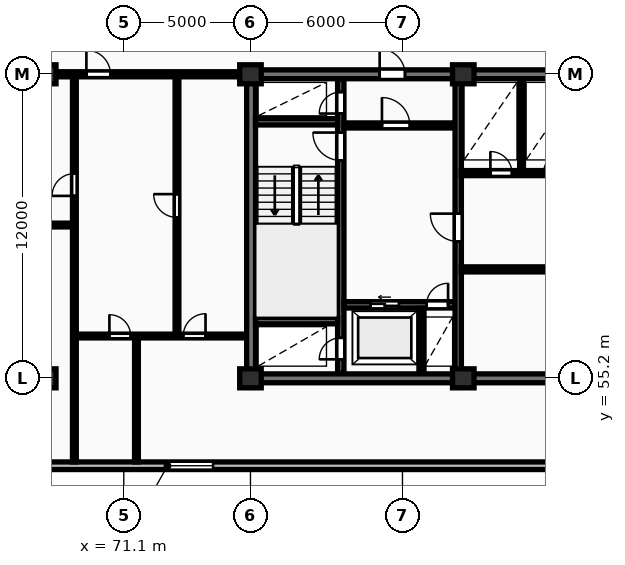
"""IFC4 building model, lengths in metres.
Left out: names, types, materials, properties, quantities, classifications, styles, units other than length and angle.
Written with IfcOpenShell. Run it as: python <this file> out.ifc"""

import sys

from ifc_helpers import new_model, si_unit, direction, frame, frame_2d, origin, origin_2d, place, context, subcontext, project, spatial, rectangle, extrude, element, fill, save


model = new_model("IFC4")
c1 = context("Model", 3, precision=1e-05, world=origin(), true_north=direction((0.0, 1.0)))
c2 = subcontext(c1, "Body", "Model", "MODEL_VIEW")
j1 = project(units=[si_unit("LENGTHUNIT", "METRE"), si_unit("PLANEANGLEUNIT", "RADIAN")], contexts=[c1])
p1 = place(None, origin())
s1 = spatial("IfcSite", under=j1, at=p1, CompositionType="ELEMENT")
p2 = place(p1, origin())
s2 = spatial("IfcBuilding", under=s1, at=p2, CompositionType="ELEMENT")
p3 = place(p2, frame((0.0, 0.0, 210.85)))
s3 = spatial("IfcBuildingStorey", under=s2, at=p3, CompositionType="ELEMENT", Elevation=210.85)
for number, where, z_axis, x_axis in (
    (1, (68.0, 55.2, 0.0), (0.0, 0.0, 1.0), (1.0, 0.0, 0.0)),
    (2, (68.0, 67.2, 0.0), (0.0, 0.0, 1.0), (1.0, 0.0, 0.0)),
    (3, (76.1, 55.2, 0.0), (0.0, 0.0, 1.0), (1.0, 0.0, 0.0)),
    (4, (76.1, 67.2, 0.0), (0.0, 0.0, 1.0), (1.0, 0.0, 0.0)),
    (5, (84.5, 55.2, 0.0), (0.0, 0.0, 1.0), (1.0, 0.0, 0.0)),
    (6, (84.5, 67.2, 0.0), (0.0, 0.0, 1.0), (1.0, 0.0, 0.0)),
):
    element("IfcColumn", number, at=place(p3, frame(where, z_axis=z_axis, x_axis=x_axis)), inside=s3, PredefinedType="COLUMN", context=c2, shape_type="SweptSolid", body=[
        extrude(rectangle(XDim=0.85, YDim=0.75, at=origin_2d()), origin(), (0.0, 0.0, 1.0), 3.25),
    ])
p4 = place(p3, frame((59.8, 51.75, 0.0), z_axis=(0.0, 0.0, 1.0), x_axis=(1.0, 0.0, 0.0)))
e7 = element("IfcWall", 7, at=p4, inside=s3, PredefinedType="STANDARD", context=c2, shape_type="SweptSolid", body=[
    extrude(rectangle(XDim=68.6, YDim=0.3, at=frame_2d((34.3, 0.0))), origin(), (0.0, 0.0, 1.0), 2.97),
])
p5 = place(p4, frame((13.025, 0.0, 0.85)))
e8 = element("IfcOpeningElement", 8, at=p5, cuts=e7, PredefinedType="OPENING", context=c2, shape_type="SweptSolid", body=[
    extrude(rectangle(XDim=1.8, YDim=1.8, at=frame_2d((0.9, 0.9))), frame((0.0, 0.16, 0.0), z_axis=(0.0, -1.0, 0.0), x_axis=(1.0, 0.0, 0.0)), (0.0, 0.0, 1.0), 0.32),
])
p6 = place(p4, frame((56.375, 0.0, 0.85)))
e9 = element("IfcOpeningElement", 9, at=p6, cuts=e7, PredefinedType="OPENING", context=c2, shape_type="SweptSolid", body=[
    extrude(rectangle(XDim=1.8, YDim=1.8, at=frame_2d((0.9, 0.9))), frame((0.0, 0.16, 0.0), z_axis=(0.0, -1.0, 0.0), x_axis=(1.0, 0.0, 0.0)), (0.0, 0.0, 1.0), 0.32),
])
p7 = place(p3, frame((75.95, 55.2, 0.0), z_axis=(0.0, 0.0, 1.0), x_axis=(1.0, 0.0, 0.0)))
e10 = element("IfcWall", 10, at=p7, inside=s3, PredefinedType="SHEAR", context=c2, shape_type="SweptSolid", body=[
    extrude(rectangle(XDim=36.3, YDim=0.35, at=frame_2d((18.15, 0.0))), origin(), (0.0, 0.0, 1.0), 3.25),
])
p8 = place(p3, frame((76.125, 55.375, 0.0), z_axis=(0.0, 0.0, 1.0), x_axis=(0.0, 1.0, 0.0)))
e11 = element("IfcWall", 11, at=p8, inside=s3, PredefinedType="SHEAR", context=c2, shape_type="SweptSolid", body=[
    extrude(rectangle(XDim=11.65, YDim=0.35, at=frame_2d((5.825, 0.0))), origin(), (0.0, 0.0, 1.0), 3.25),
])
p9 = place(p3, frame((75.95, 67.2, 0.0), z_axis=(0.0, 0.0, 1.0), x_axis=(1.0, 0.0, 0.0)))
e12 = element("IfcWall", 12, at=p9, inside=s3, PredefinedType="SHEAR", context=c2, shape_type="SweptSolid", body=[
    extrude(rectangle(XDim=36.3, YDim=0.35, at=frame_2d((18.15, 0.0))), origin(), (0.0, 0.0, 1.0), 3.25),
])
p10 = place(p9, frame((5.25, 0.0, 0.0)))
e13 = element("IfcOpeningElement", 13, at=p10, cuts=e12, PredefinedType="OPENING", context=c2, shape_type="SweptSolid", body=[
    extrude(rectangle(XDim=1.0, YDim=2.15, at=frame_2d((0.5, 1.075))), frame((0.0, 0.185, 0.0), z_axis=(0.0, -1.0, 0.0), x_axis=(1.0, 0.0, 0.0)), (0.0, 0.0, 1.0), 0.37),
])
p11 = place(p9, frame((21.6, 0.0, 0.0)))
e14 = element("IfcOpeningElement", 14, at=p11, cuts=e12, PredefinedType="OPENING", context=c2, shape_type="SweptSolid", body=[
    extrude(rectangle(XDim=1.5, YDim=2.2, at=frame_2d((0.75, 1.1))), frame((0.0, 0.185, 0.0), z_axis=(0.0, -1.0, 0.0), x_axis=(1.0, 0.0, 0.0)), (0.0, 0.0, 1.0), 0.37),
])
p12 = place(p9, frame((30.45, 0.0, 0.0)))
e15 = element("IfcOpeningElement", 15, at=p12, cuts=e12, PredefinedType="OPENING", context=c2, shape_type="SweptSolid", body=[
    extrude(rectangle(XDim=1.0, YDim=2.15, at=frame_2d((0.5, 1.075))), frame((0.0, 0.185, 0.0), z_axis=(0.0, -1.0, 0.0), x_axis=(1.0, 0.0, 0.0)), (0.0, 0.0, 1.0), 0.37),
])
p13 = place(p3, frame((79.665, 55.4, 0.0), z_axis=(0.0, 0.0, 1.0), x_axis=(0.0, 1.0, 0.0)))
e16 = element("IfcWall", 16, at=p13, inside=s3, PredefinedType="SHEAR", context=c2, shape_type="SweptSolid", body=[
    extrude(rectangle(XDim=11.6, YDim=0.25, at=frame_2d((5.8, 0.0))), origin(), (0.0, 0.0, 1.0), 3.25),
])
p14 = place(p13, frame((0.55, 0.0, 0.0)))
e17 = element("IfcOpeningElement", 17, at=p14, cuts=e16, PredefinedType="OPENING", context=c2, shape_type="SweptSolid", body=[
    extrude(rectangle(XDim=0.85, YDim=2.05, at=frame_2d((0.425, 1.025))), frame((0.0, 0.135, 0.0), z_axis=(0.0, -1.0, 0.0), x_axis=(1.0, 0.0, 0.0)), (0.0, 0.0, 1.0), 0.27),
])
p15 = place(p13, frame((8.4, 0.0, 0.0)))
e18 = element("IfcOpeningElement", 18, at=p15, cuts=e16, PredefinedType="OPENING", context=c2, shape_type="SweptSolid", body=[
    extrude(rectangle(XDim=1.1, YDim=2.1, at=frame_2d((0.55, 1.05))), frame((0.0, 0.135, 0.0), z_axis=(0.0, -1.0, 0.0), x_axis=(1.0, 0.0, 0.0)), (0.0, 0.0, 1.0), 0.27),
])
p16 = place(p13, frame((10.25, 0.0, 0.0)))
e19 = element("IfcOpeningElement", 19, at=p16, cuts=e16, PredefinedType="OPENING", context=c2, shape_type="SweptSolid", body=[
    extrude(rectangle(XDim=0.85, YDim=2.05, at=frame_2d((0.425, 1.025))), frame((0.0, 0.135, 0.0), z_axis=(0.0, -1.0, 0.0), x_axis=(1.0, 0.0, 0.0)), (0.0, 0.0, 1.0), 0.27),
])
for number, where, z_axis, x_axis in (
    (20, (76.3, 57.475, 0.0), (0.0, 0.0, 1.0), (1.0, 0.0, 0.0)),
    (21, (76.3, 65.325, 0.0), (0.0, 0.0, 1.0), (1.0, 0.0, 0.0)),
):
    element("IfcWall", number, at=place(p3, frame(where, z_axis=z_axis, x_axis=x_axis)), inside=s3, PredefinedType="SHEAR", context=c2, shape_type="SweptSolid", body=[
        extrude(rectangle(XDim=3.24, YDim=0.25, at=frame_2d((1.62, 0.0))), origin(), (0.0, 0.0, 1.0), 3.25),
    ])
p17 = place(p3, frame((79.79, 58.1, 0.0), z_axis=(0.0, 0.0, 1.0), x_axis=(1.0, 0.0, 0.0)))
e22 = element("IfcWall", 22, at=p17, inside=s3, PredefinedType="SHEAR", context=c2, shape_type="SweptSolid", body=[
    extrude(rectangle(XDim=4.39, YDim=0.25, at=frame_2d((2.195, 0.0))), origin(), (0.0, 0.0, 1.0), 3.25),
])
p18 = place(p17, frame((1.05, 0.0, 0.0)))
e23 = element("IfcOpeningElement", 23, at=p18, cuts=e22, PredefinedType="OPENING", context=c2, shape_type="SweptSolid", body=[
    extrude(rectangle(XDim=1.12, YDim=2.12, at=frame_2d((0.56, 1.06))), frame((0.0, 0.135, 0.0), z_axis=(0.0, -1.0, 0.0), x_axis=(1.0, 0.0, 0.0)), (0.0, 0.0, 1.0), 0.27),
])
p19 = place(p17, frame((3.26, 0.0, 0.0)))
e24 = element("IfcOpeningElement", 24, at=p19, cuts=e22, PredefinedType="OPENING", context=c2, shape_type="SweptSolid", body=[
    extrude(rectangle(XDim=0.85, YDim=2.05, at=frame_2d((0.425, 1.025))), frame((0.0, 0.135, 0.0), z_axis=(0.0, -1.0, 0.0), x_axis=(1.0, 0.0, 0.0)), (0.0, 0.0, 1.0), 0.27),
])
p20 = place(p3, frame((82.85, 55.4, 0.0), z_axis=(0.0, 0.0, 1.0), x_axis=(0.0, 1.0, 0.0)))
e25 = element("IfcWall", 25, at=p20, inside=s3, PredefinedType="PARTITIONING", context=c2, shape_type="SweptSolid", body=[
    extrude(rectangle(XDim=2.56, YDim=0.2, at=frame_2d((1.28, 0.0))), origin(), (0.0, 0.0, 1.0), 2.97),
])
p21 = place(p3, frame((79.79, 65.18, 0.0), z_axis=(0.0, 0.0, 1.0), x_axis=(1.0, 0.0, 0.0)))
e26 = element("IfcWall", 26, at=p21, inside=s3, PredefinedType="PARTITIONING", context=c2, shape_type="SweptSolid", body=[
    extrude(rectangle(XDim=4.39, YDim=0.2, at=frame_2d((2.195, 0.0))), origin(), (0.0, 0.0, 1.0), 2.97),
])
p22 = place(p21, frame((1.5, 0.0, 0.0)))
e27 = element("IfcOpeningElement", 27, at=p22, cuts=e26, PredefinedType="OPENING", context=c2, shape_type="SweptSolid", body=[
    extrude(rectangle(XDim=1.1, YDim=2.1, at=frame_2d((0.55, 1.05))), frame((0.0, 0.11, 0.0), z_axis=(0.0, -1.0, 0.0), x_axis=(1.0, 0.0, 0.0)), (0.0, 0.0, 1.0), 0.22),
])
p23 = place(p3, frame((84.3, 55.4, 0.0), z_axis=(0.0, 0.0, 1.0), x_axis=(0.0, 1.0, 0.0)))
e28 = element("IfcWall", 28, at=p23, inside=s3, PredefinedType="SHEAR", context=c2, shape_type="SweptSolid", body=[
    extrude(rectangle(XDim=11.6, YDim=0.25, at=frame_2d((5.8, 0.0))), origin(), (0.0, 0.0, 1.0), 3.25),
])
p24 = place(p23, frame((5.2, 0.0, 0.0)))
e29 = element("IfcOpeningElement", 29, at=p24, cuts=e28, PredefinedType="OPENING", context=c2, shape_type="SweptSolid", body=[
    extrude(rectangle(XDim=1.1, YDim=2.1, at=frame_2d((0.55, 1.05))), frame((0.0, 0.135, 0.0), z_axis=(0.0, -1.0, 0.0), x_axis=(1.0, 0.0, 0.0)), (0.0, 0.0, 1.0), 0.27),
])
p25 = place(p3, frame((84.42, 59.5, 0.0), z_axis=(0.0, 0.0, 1.0), x_axis=(1.0, 0.0, 0.0)))
e30 = element("IfcWall", 30, at=p25, inside=s3, PredefinedType="PARTITIONING", context=c2, shape_type="SweptSolid", body=[
    extrude(rectangle(XDim=8.36, YDim=0.2, at=frame_2d((4.18, 0.0))), origin(), (0.0, 0.0, 1.0), 2.97),
])
p26 = place(p25, frame((3.4, 0.0, 0.0)))
e31 = element("IfcOpeningElement", 31, at=p26, cuts=e30, PredefinedType="OPENING", context=c2, shape_type="SweptSolid", body=[
    extrude(rectangle(XDim=0.92, YDim=2.08, at=frame_2d((0.46, 1.04))), frame((0.0, 0.11, 0.0), z_axis=(0.0, -1.0, 0.0), x_axis=(1.0, 0.0, 0.0)), (0.0, 0.0, 1.0), 0.22),
])
p27 = place(p3, frame((86.8, 63.4, 0.0), z_axis=(0.0, 0.0, 1.0), x_axis=(0.0, 1.0, 0.0)))
e32 = element("IfcWall", 32, at=p27, inside=s3, PredefinedType="PARTITIONING", context=c2, shape_type="SweptSolid", body=[
    extrude(rectangle(XDim=3.6, YDim=0.15, at=frame_2d((1.8, 0.0))), origin(), (0.0, 0.0, 1.0), 2.97),
])
p28 = place(p3, frame((84.42, 63.3, 0.0), z_axis=(0.0, 0.0, 1.0), x_axis=(1.0, 0.0, 0.0)))
e33 = element("IfcWall", 33, at=p28, inside=s3, PredefinedType="PARTITIONING", context=c2, shape_type="SweptSolid", body=[
    extrude(rectangle(XDim=19.83, YDim=0.2, at=frame_2d((9.915, 0.0))), origin(), (0.0, 0.0, 1.0), 2.97),
])
p29 = place(p28, frame((1.15, 0.0, 0.0)))
e34 = element("IfcOpeningElement", 34, at=p29, cuts=e33, PredefinedType="OPENING", context=c2, shape_type="SweptSolid", body=[
    extrude(rectangle(XDim=0.85, YDim=2.05, at=frame_2d((0.425, 1.025))), frame((0.0, 0.11, 0.0), z_axis=(0.0, -1.0, 0.0), x_axis=(1.0, 0.0, 0.0)), (0.0, 0.0, 1.0), 0.22),
])
p30 = place(p28, frame((3.25, 0.0, 0.0)))
e35 = element("IfcOpeningElement", 35, at=p30, cuts=e33, PredefinedType="OPENING", context=c2, shape_type="SweptSolid", body=[
    extrude(rectangle(XDim=0.85, YDim=2.05, at=frame_2d((0.425, 1.025))), frame((0.0, 0.11, 0.0), z_axis=(0.0, -1.0, 0.0), x_axis=(1.0, 0.0, 0.0)), (0.0, 0.0, 1.0), 0.22),
])
p31 = place(p28, frame((13.08, 0.0, 0.0)))
e36 = element("IfcOpeningElement", 36, at=p31, cuts=e33, PredefinedType="OPENING", context=c2, shape_type="SweptSolid", body=[
    extrude(rectangle(XDim=1.5, YDim=2.2, at=frame_2d((0.75, 1.1))), frame((0.0, 0.11, 0.0), z_axis=(0.0, -1.0, 0.0), x_axis=(1.0, 0.0, 0.0)), (0.0, 0.0, 1.0), 0.22),
])
p32 = place(p28, frame((5.53, 0.0, 0.0)))
e37 = element("IfcOpeningElement", 37, at=p32, cuts=e33, PredefinedType="OPENING", context=c2, shape_type="SweptSolid", body=[
    extrude(rectangle(XDim=0.88, YDim=2.06, at=frame_2d((0.44, 1.03))), frame((0.0, 0.11, 0.0), z_axis=(0.0, -1.0, 0.0), x_axis=(1.0, 0.0, 0.0)), (0.0, 0.0, 1.0), 0.22),
])
p33 = place(p28, frame((7.68, 0.0, 0.0)))
e38 = element("IfcOpeningElement", 38, at=p33, cuts=e33, PredefinedType="OPENING", context=c2, shape_type="SweptSolid", body=[
    extrude(rectangle(XDim=0.88, YDim=2.06, at=frame_2d((0.44, 1.03))), frame((0.0, 0.11, 0.0), z_axis=(0.0, -1.0, 0.0), x_axis=(1.0, 0.0, 0.0)), (0.0, 0.0, 1.0), 0.22),
])
p34 = place(p28, frame((10.43, 0.0, 0.0)))
e39 = element("IfcOpeningElement", 39, at=p34, cuts=e33, PredefinedType="OPENING", context=c2, shape_type="SweptSolid", body=[
    extrude(rectangle(XDim=0.85, YDim=2.05, at=frame_2d((0.425, 1.025))), frame((0.0, 0.11, 0.0), z_axis=(0.0, -1.0, 0.0), x_axis=(1.0, 0.0, 0.0)), (0.0, 0.0, 1.0), 0.22),
])
p35 = place(p28, frame((16.23, 0.0, 0.0)))
e40 = element("IfcOpeningElement", 40, at=p35, cuts=e33, PredefinedType="OPENING", context=c2, shape_type="SweptSolid", body=[
    extrude(rectangle(XDim=0.96, YDim=2.1, at=frame_2d((0.48, 1.05))), frame((0.0, 0.11, 0.0), z_axis=(0.0, -1.0, 0.0), x_axis=(1.0, 0.0, 0.0)), (0.0, 0.0, 1.0), 0.22),
])
p36 = place(p28, frame((18.68, 0.0, 0.0)))
e41 = element("IfcOpeningElement", 41, at=p36, cuts=e33, PredefinedType="OPENING", context=c2, shape_type="SweptSolid", body=[
    extrude(rectangle(XDim=0.84, YDim=2.04, at=frame_2d((0.42, 1.02))), frame((0.0, 0.11, 0.0), z_axis=(0.0, -1.0, 0.0), x_axis=(1.0, 0.0, 0.0)), (0.0, 0.0, 1.0), 0.22),
])
p37 = place(p3, frame((59.8, 61.25, 0.0), z_axis=(0.0, 0.0, 1.0), x_axis=(1.0, 0.0, 0.0)))
e42 = element("IfcWall", 42, at=p37, inside=s3, PredefinedType="PARTITIONING", context=c2, shape_type="SweptSolid", body=[
    extrude(rectangle(XDim=9.35, YDim=0.15, at=frame_2d((4.675, 0.0))), origin(), (0.0, 0.0, 1.0), 2.97),
])
p38 = place(p37, frame((4.255, 0.0, 0.0)))
e43 = element("IfcOpeningElement", 43, at=p38, cuts=e42, PredefinedType="OPENING", context=c2, shape_type="SweptSolid", body=[
    extrude(rectangle(XDim=0.84, YDim=2.04, at=frame_2d((0.42, 1.02))), frame((0.0, 0.085, 0.0), z_axis=(0.0, -1.0, 0.0), x_axis=(1.0, 0.0, 0.0)), (0.0, 0.0, 1.0), 0.17),
])
p39 = place(p3, frame((69.15, 51.9, 0.0), z_axis=(0.0, 0.0, 1.0), x_axis=(0.0, 1.0, 0.0)))
e44 = element("IfcWall", 44, at=p39, inside=s3, PredefinedType="PARTITIONING", context=c2, shape_type="SweptSolid", body=[
    extrude(rectangle(XDim=15.25, YDim=0.15, at=frame_2d((7.625, 0.0))), origin(), (0.0, 0.0, 1.0), 2.97),
])
p40 = place(p39, frame((10.5, 0.0, 0.0)))
e45 = element("IfcOpeningElement", 45, at=p40, cuts=e44, PredefinedType="OPENING", context=c2, shape_type="SweptSolid", body=[
    extrude(rectangle(XDim=0.88, YDim=2.06, at=frame_2d((0.44, 1.03))), frame((0.0, 0.085, 0.0), z_axis=(0.0, -1.0, 0.0), x_axis=(1.0, 0.0, 0.0)), (0.0, 0.0, 1.0), 0.17),
])
p41 = place(p3, frame((73.2, 56.87, 0.0), z_axis=(0.0, 0.0, 1.0), x_axis=(0.0, 1.0, 0.0)))
e46 = element("IfcWall", 46, at=p41, inside=s3, PredefinedType="PARTITIONING", context=c2, shape_type="SweptSolid", body=[
    extrude(rectangle(XDim=10.28, YDim=0.15, at=frame_2d((5.14, 0.0))), origin(), (0.0, 0.0, 1.0), 2.97),
])
p42 = place(p41, frame((4.68, 0.0, 0.0)))
e47 = element("IfcOpeningElement", 47, at=p42, cuts=e46, PredefinedType="OPENING", context=c2, shape_type="SweptSolid", body=[
    extrude(rectangle(XDim=0.92, YDim=2.08, at=frame_2d((0.46, 1.04))), frame((0.0, 0.085, 0.0), z_axis=(0.0, -1.0, 0.0), x_axis=(1.0, 0.0, 0.0)), (0.0, 0.0, 1.0), 0.17),
])
p43 = place(p3, frame((71.6, 51.9, 0.0), z_axis=(0.0, 0.0, 1.0), x_axis=(0.0, 1.0, 0.0)))
e48 = element("IfcWall", 48, at=p43, inside=s3, PredefinedType="PARTITIONING", context=c2, shape_type="SweptSolid", body=[
    extrude(rectangle(XDim=4.97, YDim=0.15, at=frame_2d((2.485, 0.0))), origin(), (0.0, 0.0, 1.0), 2.97),
])
p44 = place(p3, frame((69.17, 56.87, 0.0), z_axis=(0.0, 0.0, 1.0), x_axis=(1.0, 0.0, 0.0)))
e49 = element("IfcWall", 49, at=p44, inside=s3, PredefinedType="PARTITIONING", context=c2, shape_type="SweptSolid", body=[
    extrude(rectangle(XDim=6.76, YDim=0.15, at=frame_2d((3.38, 0.0))), origin(), (0.0, 0.0, 1.0), 2.97),
])
p45 = place(p44, frame((1.362, 0.0, 0.0)))
e50 = element("IfcOpeningElement", 50, at=p45, cuts=e49, PredefinedType="OPENING", context=c2, shape_type="SweptSolid", body=[
    extrude(rectangle(XDim=0.84, YDim=2.04, at=frame_2d((0.42, 1.02))), frame((0.0, 0.085, 0.0), z_axis=(0.0, -1.0, 0.0), x_axis=(1.0, 0.0, 0.0)), (0.0, 0.0, 1.0), 0.17),
])
p46 = place(p44, frame((4.277, 0.0, 0.0)))
e51 = element("IfcOpeningElement", 51, at=p46, cuts=e49, PredefinedType="OPENING", context=c2, shape_type="SweptSolid", body=[
    extrude(rectangle(XDim=0.88, YDim=2.06, at=frame_2d((0.44, 1.03))), frame((0.0, 0.085, 0.0), z_axis=(0.0, -1.0, 0.0), x_axis=(1.0, 0.0, 0.0)), (0.0, 0.0, 1.0), 0.17),
])
p47 = place(p3, frame((59.8, 67.2, 0.0), z_axis=(0.0, 0.0, 1.0), x_axis=(1.0, 0.0, 0.0)))
e52 = element("IfcWall", 52, at=p47, inside=s3, PredefinedType="PARTITIONING", context=c2, shape_type="SweptSolid", body=[
    extrude(rectangle(XDim=16.15, YDim=0.2, at=frame_2d((8.075, 0.0))), origin(), (0.0, 0.0, 1.0), 2.433),
])
p48 = place(p47, frame((9.823, 0.0, 0.0)))
e53 = element("IfcOpeningElement", 53, at=p48, cuts=e52, PredefinedType="OPENING", context=c2, shape_type="SweptSolid", body=[
    extrude(rectangle(XDim=0.95, YDim=2.15, at=frame_2d((0.475, 1.075))), frame((0.0, 0.11, 0.0), z_axis=(0.0, -1.0, 0.0), x_axis=(1.0, 0.0, 0.0)), (0.0, 0.0, 1.0), 0.22),
])
p49 = place(p5, origin())
e54 = element("IfcWindow", 54, at=p49, inside=s3, PartitioningType="SINGLE_PANEL", PredefinedType="WINDOW", context=c2, shape_type="SweptSolid", body=[
    extrude(rectangle(XDim=1.8, YDim=1.8, at=frame_2d((0.9, 0.9))), frame((0.0, 0.03, 0.0), z_axis=(0.0, -1.0, 0.0), x_axis=(1.0, 0.0, 0.0)), (0.0, 0.0, 1.0), 0.06),
])
fill(e8, e54)
p50 = place(p10, origin())
e55 = element("IfcDoor", 55, at=p50, inside=s3, OperationType="SINGLE_SWING_LEFT", PredefinedType="DOOR", context=c2, shape_type="SweptSolid", body=[
    extrude(rectangle(XDim=1.0, YDim=2.15, at=frame_2d((0.5, 1.075))), frame((0.0, 0.025, 0.0), z_axis=(0.0, -1.0, 0.0), x_axis=(1.0, 0.0, 0.0)), (0.0, 0.0, 1.0), 0.05),
])
fill(e13, e55)
p51 = place(p14, origin())
e56 = element("IfcDoor", 56, at=p51, inside=s3, OperationType="SINGLE_SWING_LEFT", PredefinedType="DOOR", context=c2, shape_type="SweptSolid", body=[
    extrude(rectangle(XDim=0.85, YDim=2.05, at=frame_2d((0.425, 1.025))), frame((0.0, 0.025, 0.0), z_axis=(0.0, -1.0, 0.0), x_axis=(1.0, 0.0, 0.0)), (0.0, 0.0, 1.0), 0.05),
])
fill(e17, e56)
p52 = place(p15, origin())
e57 = element("IfcDoor", 57, at=p52, inside=s3, OperationType="SINGLE_SWING_RIGHT", PredefinedType="DOOR", context=c2, shape_type="SweptSolid", body=[
    extrude(rectangle(XDim=1.1, YDim=2.1, at=frame_2d((0.55, 1.05))), frame((0.0, 0.025, 0.0), z_axis=(0.0, -1.0, 0.0), x_axis=(1.0, 0.0, 0.0)), (0.0, 0.0, 1.0), 0.05),
])
fill(e18, e57)
p53 = place(p16, origin())
e58 = element("IfcDoor", 58, at=p53, inside=s3, OperationType="SINGLE_SWING_LEFT", PredefinedType="DOOR", context=c2, shape_type="SweptSolid", body=[
    extrude(rectangle(XDim=0.85, YDim=2.05, at=frame_2d((0.425, 1.025))), frame((0.0, 0.025, 0.0), z_axis=(0.0, -1.0, 0.0), x_axis=(1.0, 0.0, 0.0)), (0.0, 0.0, 1.0), 0.05),
])
fill(e19, e58)
p54 = place(p18, origin())
e59 = element("IfcDoor", 59, at=p54, inside=s3, OperationType="SLIDING_TO_LEFT", PredefinedType="DOOR", context=c2, shape_type="SweptSolid", body=[
    extrude(rectangle(XDim=1.12, YDim=2.12, at=frame_2d((0.56, 1.06))), frame((0.0, 0.025, 0.0), z_axis=(0.0, -1.0, 0.0), x_axis=(1.0, 0.0, 0.0)), (0.0, 0.0, 1.0), 0.05),
])
fill(e23, e59)
p55 = place(p19, origin())
e60 = element("IfcDoor", 60, at=p55, inside=s3, OperationType="SINGLE_SWING_RIGHT", PredefinedType="DOOR", context=c2, shape_type="SweptSolid", body=[
    extrude(rectangle(XDim=0.85, YDim=2.05, at=frame_2d((0.425, 1.025))), frame((0.0, 0.025, 0.0), z_axis=(0.0, -1.0, 0.0), x_axis=(1.0, 0.0, 0.0)), (0.0, 0.0, 1.0), 0.05),
])
fill(e24, e60)
p56 = place(p22, origin())
e61 = element("IfcDoor", 61, at=p56, inside=s3, OperationType="SINGLE_SWING_LEFT", PredefinedType="DOOR", context=c2, shape_type="SweptSolid", body=[
    extrude(rectangle(XDim=1.1, YDim=2.1, at=frame_2d((0.55, 1.05))), frame((0.0, 0.025, 0.0), z_axis=(0.0, -1.0, 0.0), x_axis=(1.0, 0.0, 0.0)), (0.0, 0.0, 1.0), 0.05),
])
fill(e27, e61)
p57 = place(p24, origin())
e62 = element("IfcDoor", 62, at=p57, inside=s3, OperationType="SINGLE_SWING_RIGHT", PredefinedType="DOOR", context=c2, shape_type="SweptSolid", body=[
    extrude(rectangle(XDim=1.1, YDim=2.1, at=frame_2d((0.55, 1.05))), frame((0.0, 0.025, 0.0), z_axis=(0.0, -1.0, 0.0), x_axis=(1.0, 0.0, 0.0)), (0.0, 0.0, 1.0), 0.05),
])
fill(e29, e62)
p58 = place(p29, origin())
e63 = element("IfcDoor", 63, at=p58, inside=s3, OperationType="SINGLE_SWING_LEFT", PredefinedType="DOOR", context=c2, shape_type="SweptSolid", body=[
    extrude(rectangle(XDim=0.85, YDim=2.05, at=frame_2d((0.425, 1.025))), frame((0.0, 0.025, 0.0), z_axis=(0.0, -1.0, 0.0), x_axis=(1.0, 0.0, 0.0)), (0.0, 0.0, 1.0), 0.05),
])
fill(e34, e63)
p59 = place(p30, origin())
e64 = element("IfcDoor", 64, at=p59, inside=s3, OperationType="SINGLE_SWING_RIGHT", PredefinedType="DOOR", context=c2, shape_type="SweptSolid", body=[
    extrude(rectangle(XDim=0.85, YDim=2.05, at=frame_2d((0.425, 1.025))), frame((0.0, 0.025, 0.0), z_axis=(0.0, -1.0, 0.0), x_axis=(1.0, 0.0, 0.0)), (0.0, 0.0, 1.0), 0.05),
])
fill(e35, e64)
p60 = place(p40, origin())
e65 = element("IfcDoor", 65, at=p60, inside=s3, OperationType="SINGLE_SWING_LEFT", PredefinedType="DOOR", context=c2, shape_type="SweptSolid", body=[
    extrude(rectangle(XDim=0.88, YDim=2.06, at=frame_2d((0.44, 1.03))), frame((0.0, 0.025, 0.0), z_axis=(0.0, -1.0, 0.0), x_axis=(1.0, 0.0, 0.0)), (0.0, 0.0, 1.0), 0.05),
])
fill(e45, e65)
p61 = place(p42, origin())
e66 = element("IfcDoor", 66, at=p61, inside=s3, OperationType="SINGLE_SWING_RIGHT", PredefinedType="DOOR", context=c2, shape_type="SweptSolid", body=[
    extrude(rectangle(XDim=0.92, YDim=2.08, at=frame_2d((0.46, 1.04))), frame((0.0, 0.025, 0.0), z_axis=(0.0, -1.0, 0.0), x_axis=(1.0, 0.0, 0.0)), (0.0, 0.0, 1.0), 0.05),
])
fill(e47, e66)
p62 = place(p45, origin())
e67 = element("IfcDoor", 67, at=p62, inside=s3, OperationType="SINGLE_SWING_LEFT", PredefinedType="DOOR", context=c2, shape_type="SweptSolid", body=[
    extrude(rectangle(XDim=0.84, YDim=2.04, at=frame_2d((0.42, 1.02))), frame((0.0, 0.025, 0.0), z_axis=(0.0, -1.0, 0.0), x_axis=(1.0, 0.0, 0.0)), (0.0, 0.0, 1.0), 0.05),
])
fill(e50, e67)
p63 = place(p46, origin())
e68 = element("IfcDoor", 68, at=p63, inside=s3, OperationType="SINGLE_SWING_RIGHT", PredefinedType="DOOR", context=c2, shape_type="SweptSolid", body=[
    extrude(rectangle(XDim=0.88, YDim=2.06, at=frame_2d((0.44, 1.03))), frame((0.0, 0.025, 0.0), z_axis=(0.0, -1.0, 0.0), x_axis=(1.0, 0.0, 0.0)), (0.0, 0.0, 1.0), 0.05),
])
fill(e51, e68)
p64 = place(p48, origin())
e69 = element("IfcDoor", 69, at=p64, inside=s3, OperationType="SINGLE_SWING_LEFT", PredefinedType="DOOR", context=c2, shape_type="SweptSolid", body=[
    extrude(rectangle(XDim=0.95, YDim=2.15, at=frame_2d((0.475, 1.075))), frame((0.0, 0.025, 0.0), z_axis=(0.0, -1.0, 0.0), x_axis=(1.0, 0.0, 0.0)), (0.0, 0.0, 1.0), 0.05),
])
fill(e53, e69)
save(model, sys.argv[1])
